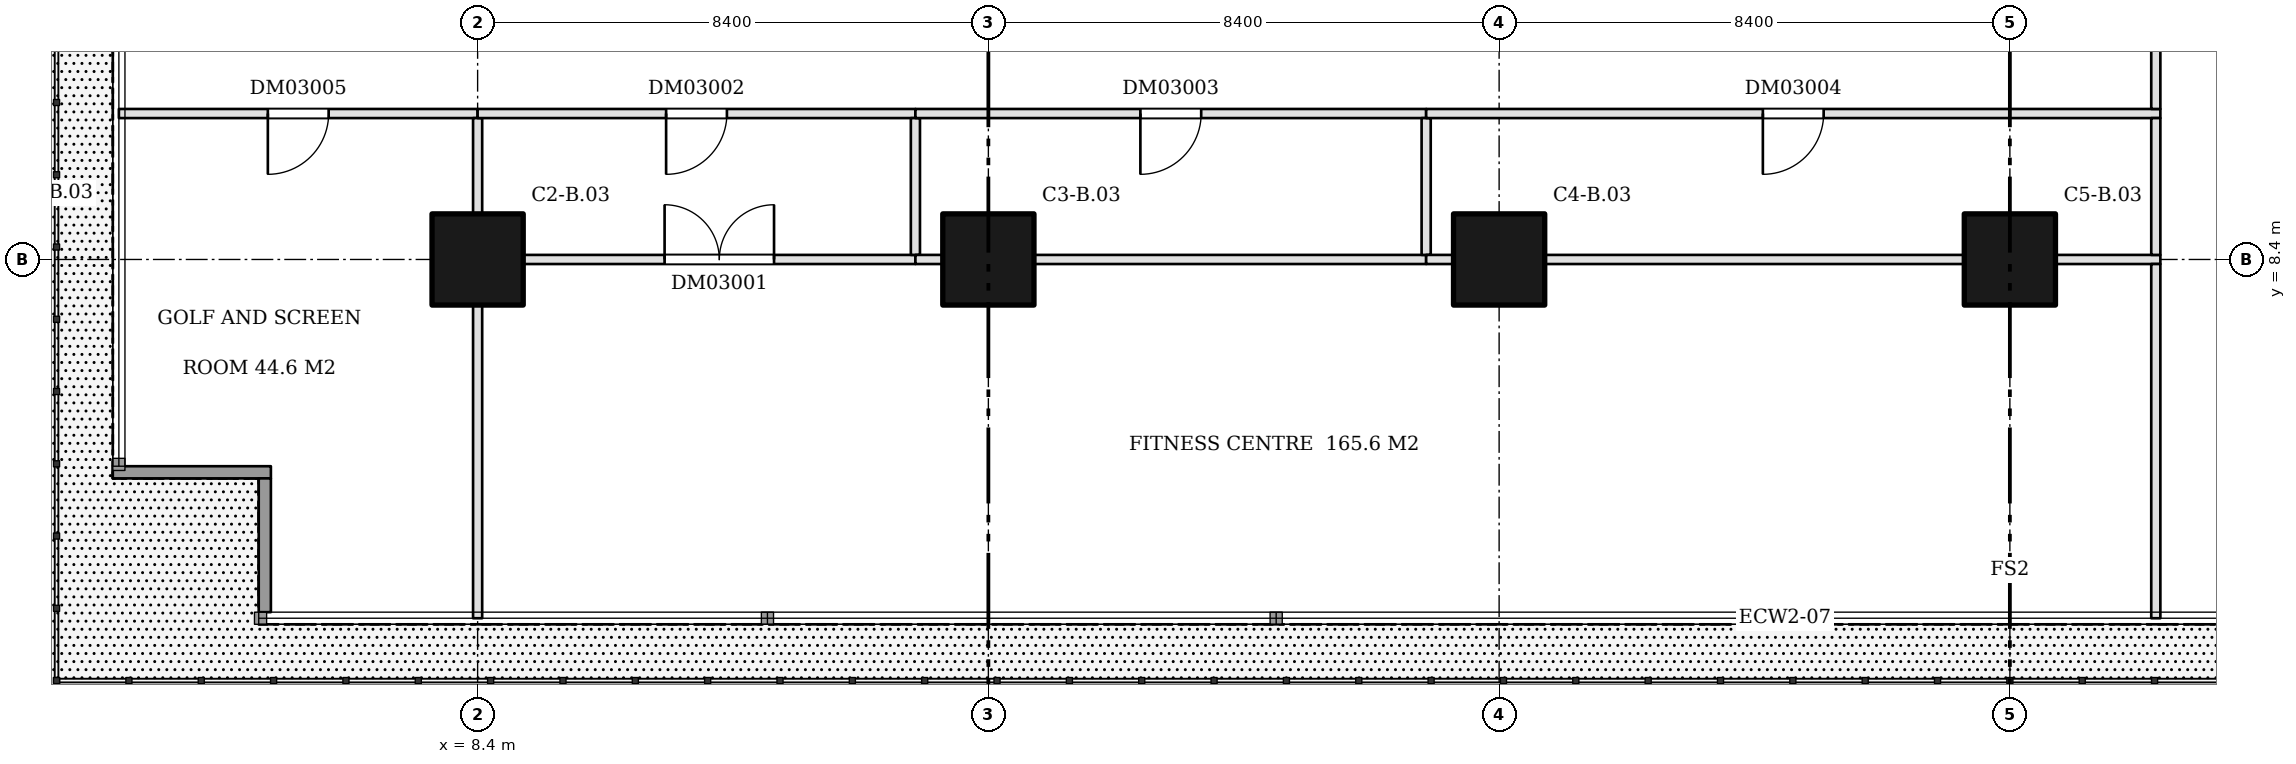
"""IFC4 building model, lengths in metres.
Left out: names, types, materials, properties, quantities, classifications, styles, units other than length and angle.
Written with IfcOpenShell. Run it as: python <this file> out.ifc"""

import sys

from ifc_helpers import new_model, si_unit, direction, frame, frame_2d, origin, origin_2d, place, context, subcontext, project, spatial, rectangle, extrude, element, fill, save


model = new_model("IFC4")
c1 = context("Model", 3, precision=1e-05, world=origin(), true_north=direction((0.0, 1.0)))
c2 = subcontext(c1, "Body", "Model", "MODEL_VIEW")
j1 = project(units=[si_unit("LENGTHUNIT", "METRE"), si_unit("PLANEANGLEUNIT", "RADIAN")], contexts=[c1])
p1 = place(None, origin())
s1 = spatial("IfcSite", under=j1, at=p1, CompositionType="ELEMENT")
p2 = place(p1, origin())
s2 = spatial("IfcBuilding", under=s1, at=p2, CompositionType="ELEMENT")
p3 = place(p2, frame((0.0, 0.0, 19.8)))
s3 = spatial("IfcBuildingStorey", under=s2, at=p3, CompositionType="ELEMENT", Elevation=19.8)
for number, where, z_axis, x_axis in (
    (1, (8.4, 8.4, 0.0), (0.0, 0.0, 1.0), (1.0, 0.0, 0.0)),
    (2, (16.8, 8.4, 0.0), (0.0, 0.0, 1.0), (1.0, 0.0, 0.0)),
    (3, (25.2, 8.4, 0.0), (0.0, 0.0, 1.0), (1.0, 0.0, 0.0)),
    (4, (33.6, 8.4, 0.0), (0.0, 0.0, 1.0), (1.0, 0.0, 0.0)),
):
    element("IfcColumn", number, at=place(p3, frame(where, z_axis=z_axis, x_axis=x_axis)), inside=s3, PredefinedType="COLUMN", context=c2, shape_type="SweptSolid", body=[
        extrude(rectangle(XDim=1.5, YDim=1.5, at=origin_2d()), origin(), (0.0, 0.0, 1.0), 5.12),
    ])
p4 = place(p3, frame((2.5, 10.8, 0.0), z_axis=(0.0, 0.0, 1.0), x_axis=(1.0, 0.0, 0.0)))
e5 = element("IfcWall", 5, at=p4, inside=s3, PredefinedType="PARTITIONING", context=c2, shape_type="SweptSolid", body=[
    extrude(rectangle(XDim=5.9, YDim=0.15, at=frame_2d((2.95, 0.0))), origin(), (0.0, 0.0, 1.0), 5.12),
])
p5 = place(p4, frame((2.45, 0.0, 0.0)))
e6 = element("IfcOpeningElement", 6, at=p5, cuts=e5, PredefinedType="OPENING", context=c2, shape_type="SweptSolid", body=[
    extrude(rectangle(XDim=1.0, YDim=2.1, at=frame_2d((0.5, 1.05))), frame((0.0, 0.085, 0.0), z_axis=(0.0, -1.0, 0.0), x_axis=(1.0, 0.0, 0.0)), (0.0, 0.0, 1.0), 0.17),
])
p6 = place(p3, frame((8.4, 2.5, 0.0), z_axis=(0.0, 0.0, 1.0), x_axis=(0.0, 1.0, 0.0)))
e7 = element("IfcWall", 7, at=p6, inside=s3, PredefinedType="PARTITIONING", context=c2, shape_type="SweptSolid", body=[
    extrude(rectangle(XDim=5.15, YDim=0.15, at=frame_2d((2.575, 0.0))), origin(), (0.0, 0.0, 1.0), 5.12),
])
p7 = place(p3, frame((8.4, 9.15, 0.0), z_axis=(0.0, 0.0, 1.0), x_axis=(0.0, 1.0, 0.0)))
e8 = element("IfcWall", 8, at=p7, inside=s3, PredefinedType="PARTITIONING", context=c2, shape_type="SweptSolid", body=[
    extrude(rectangle(XDim=1.575, YDim=0.15, at=frame_2d((0.788, 0.0))), origin(), (0.0, 0.0, 1.0), 5.12),
])
p8 = place(p3, frame((9.15, 8.4, 0.0), z_axis=(0.0, 0.0, 1.0), x_axis=(1.0, 0.0, 0.0)))
e9 = element("IfcWall", 9, at=p8, inside=s3, PredefinedType="PARTITIONING", context=c2, shape_type="SweptSolid", body=[
    extrude(rectangle(XDim=6.45, YDim=0.15, at=frame_2d((3.225, 0.0))), origin(), (0.0, 0.0, 1.0), 5.12),
])
p9 = place(p8, frame((2.325, 0.0, 0.0)))
e10 = element("IfcOpeningElement", 10, at=p9, cuts=e9, PredefinedType="OPENING", context=c2, shape_type="SweptSolid", body=[
    extrude(rectangle(XDim=1.8, YDim=2.1, at=frame_2d((0.9, 1.05))), frame((0.0, 0.085, 0.0), z_axis=(0.0, -1.0, 0.0), x_axis=(1.0, 0.0, 0.0)), (0.0, 0.0, 1.0), 0.17),
])
p10 = place(p3, frame((8.4, 10.8, 0.0), z_axis=(0.0, 0.0, 1.0), x_axis=(1.0, 0.0, 0.0)))
e11 = element("IfcWall", 11, at=p10, inside=s3, PredefinedType="PARTITIONING", context=c2, shape_type="SweptSolid", body=[
    extrude(rectangle(XDim=7.2, YDim=0.15, at=frame_2d((3.6, 0.0))), origin(), (0.0, 0.0, 1.0), 5.12),
])
p11 = place(p10, frame((3.1, 0.0, 0.0)))
e12 = element("IfcOpeningElement", 12, at=p11, cuts=e11, PredefinedType="OPENING", context=c2, shape_type="SweptSolid", body=[
    extrude(rectangle(XDim=1.0, YDim=2.1, at=frame_2d((0.5, 1.05))), frame((0.0, 0.085, 0.0), z_axis=(0.0, -1.0, 0.0), x_axis=(1.0, 0.0, 0.0)), (0.0, 0.0, 1.0), 0.17),
])
p12 = place(p3, frame((15.6, 8.475, 0.0), z_axis=(0.0, 0.0, 1.0), x_axis=(0.0, 1.0, 0.0)))
e13 = element("IfcWall", 13, at=p12, inside=s3, PredefinedType="PARTITIONING", context=c2, shape_type="SweptSolid", body=[
    extrude(rectangle(XDim=2.25, YDim=0.15, at=frame_2d((1.125, 0.0))), origin(), (0.0, 0.0, 1.0), 5.12),
])
p13 = place(p3, frame((15.6, 8.4, 0.0), z_axis=(0.0, 0.0, 1.0), x_axis=(1.0, 0.0, 0.0)))
e14 = element("IfcWall", 14, at=p13, inside=s3, PredefinedType="PARTITIONING", context=c2, shape_type="SweptSolid", body=[
    extrude(rectangle(XDim=0.45, YDim=0.15, at=frame_2d((0.225, 0.0))), origin(), (0.0, 0.0, 1.0), 5.12),
])
p14 = place(p3, frame((17.55, 8.4, 0.0), z_axis=(0.0, 0.0, 1.0), x_axis=(1.0, 0.0, 0.0)))
e15 = element("IfcWall", 15, at=p14, inside=s3, PredefinedType="PARTITIONING", context=c2, shape_type="SweptSolid", body=[
    extrude(rectangle(XDim=6.45, YDim=0.15, at=frame_2d((3.225, 0.0))), origin(), (0.0, 0.0, 1.0), 5.12),
])
p15 = place(p3, frame((15.6, 10.8, 0.0), z_axis=(0.0, 0.0, 1.0), x_axis=(1.0, 0.0, 0.0)))
e16 = element("IfcWall", 16, at=p15, inside=s3, PredefinedType="PARTITIONING", context=c2, shape_type="SweptSolid", body=[
    extrude(rectangle(XDim=8.4, YDim=0.15, at=frame_2d((4.2, 0.0))), origin(), (0.0, 0.0, 1.0), 5.12),
])
p16 = place(p15, frame((3.7, 0.0, 0.0)))
e17 = element("IfcOpeningElement", 17, at=p16, cuts=e16, PredefinedType="OPENING", context=c2, shape_type="SweptSolid", body=[
    extrude(rectangle(XDim=1.0, YDim=2.1, at=frame_2d((0.5, 1.05))), frame((0.0, 0.085, 0.0), z_axis=(0.0, -1.0, 0.0), x_axis=(1.0, 0.0, 0.0)), (0.0, 0.0, 1.0), 0.17),
])
p17 = place(p3, frame((24.0, 8.475, 0.0), z_axis=(0.0, 0.0, 1.0), x_axis=(0.0, 1.0, 0.0)))
e18 = element("IfcWall", 18, at=p17, inside=s3, PredefinedType="PARTITIONING", context=c2, shape_type="SweptSolid", body=[
    extrude(rectangle(XDim=2.25, YDim=0.15, at=frame_2d((1.125, 0.0))), origin(), (0.0, 0.0, 1.0), 5.12),
])
p18 = place(p3, frame((24.0, 8.4, 0.0), z_axis=(0.0, 0.0, 1.0), x_axis=(1.0, 0.0, 0.0)))
e19 = element("IfcWall", 19, at=p18, inside=s3, PredefinedType="PARTITIONING", context=c2, shape_type="SweptSolid", body=[
    extrude(rectangle(XDim=0.45, YDim=0.15, at=frame_2d((0.225, 0.0))), origin(), (0.0, 0.0, 1.0), 5.12),
])
p19 = place(p3, frame((25.95, 8.4, 0.0), z_axis=(0.0, 0.0, 1.0), x_axis=(1.0, 0.0, 0.0)))
e20 = element("IfcWall", 20, at=p19, inside=s3, PredefinedType="PARTITIONING", context=c2, shape_type="SweptSolid", body=[
    extrude(rectangle(XDim=6.9, YDim=0.15, at=frame_2d((3.45, 0.0))), origin(), (0.0, 0.0, 1.0), 5.12),
])
p20 = place(p3, frame((34.35, 8.4, 0.0), z_axis=(0.0, 0.0, 1.0), x_axis=(1.0, 0.0, 0.0)))
e21 = element("IfcWall", 21, at=p20, inside=s3, PredefinedType="PARTITIONING", context=c2, shape_type="SweptSolid", body=[
    extrude(rectangle(XDim=1.725, YDim=0.15, at=frame_2d((0.862, 0.0))), origin(), (0.0, 0.0, 1.0), 5.12),
])
p21 = place(p3, frame((24.0, 10.8, 0.0), z_axis=(0.0, 0.0, 1.0), x_axis=(1.0, 0.0, 0.0)))
e22 = element("IfcWall", 22, at=p21, inside=s3, PredefinedType="PARTITIONING", context=c2, shape_type="SweptSolid", body=[
    extrude(rectangle(XDim=12.075, YDim=0.15, at=frame_2d((6.038, 0.0))), origin(), (0.0, 0.0, 1.0), 5.12),
])
p22 = place(p21, frame((5.538, 0.0, 0.0)))
e23 = element("IfcOpeningElement", 23, at=p22, cuts=e22, PredefinedType="OPENING", context=c2, shape_type="SweptSolid", body=[
    extrude(rectangle(XDim=1.0, YDim=2.1, at=frame_2d((0.5, 1.05))), frame((0.0, 0.085, 0.0), z_axis=(0.0, -1.0, 0.0), x_axis=(1.0, 0.0, 0.0)), (0.0, 0.0, 1.0), 0.17),
])
p23 = place(p3, frame((36.0, 2.5, 0.0), z_axis=(0.0, 0.0, 1.0), x_axis=(0.0, 1.0, 0.0)))
e24 = element("IfcWall", 24, at=p23, inside=s3, PredefinedType="PARTITIONING", context=c2, shape_type="SweptSolid", body=[
    extrude(rectangle(XDim=5.825, YDim=0.15, at=frame_2d((2.913, 0.0))), origin(), (0.0, 0.0, 1.0), 5.12),
])
p24 = place(p3, frame((36.0, 8.475, 0.0), z_axis=(0.0, 0.0, 1.0), x_axis=(0.0, 1.0, 0.0)))
e25 = element("IfcWall", 25, at=p24, inside=s3, PredefinedType="PARTITIONING", context=c2, shape_type="SweptSolid", body=[
    extrude(rectangle(XDim=2.25, YDim=0.15, at=frame_2d((1.125, 0.0))), origin(), (0.0, 0.0, 1.0), 5.12),
])
p25 = place(p3, frame((36.0, 10.875, 0.0), z_axis=(0.0, 0.0, 1.0), x_axis=(0.0, 1.0, 0.0)))
e26 = element("IfcWall", 26, at=p25, inside=s3, PredefinedType="PARTITIONING", context=c2, shape_type="SweptSolid", body=[
    extrude(rectangle(XDim=3.45, YDim=0.15, at=frame_2d((1.725, 0.0))), origin(), (0.0, 0.0, 1.0), 5.12),
])
p26 = place(p3, frame((2.4, 4.9, 0.0), z_axis=(0.0, 0.0, 1.0), x_axis=(1.0, 0.0, 0.0)))
e27 = element("IfcWall", 27, at=p26, inside=s3, PredefinedType="SOLIDWALL", context=c2, shape_type="SweptSolid", body=[
    extrude(rectangle(XDim=2.6, YDim=0.2, at=frame_2d((1.3, 0.0))), origin(), (0.0, 0.0, 1.0), 5.12),
])
p27 = place(p3, frame((4.9, 4.8, 0.0), z_axis=(0.0, 0.0, 1.0), x_axis=(0.0, -1.0, 0.0)))
e28 = element("IfcWall", 28, at=p27, inside=s3, PredefinedType="SOLIDWALL", context=c2, shape_type="SweptSolid", body=[
    extrude(rectangle(XDim=2.2, YDim=0.2, at=frame_2d((1.1, 0.0))), origin(), (0.0, 0.0, 1.0), 5.12),
])
p28 = place(p9, origin())
e29 = element("IfcDoor", 29, at=p28, inside=s3, OperationType="DOUBLE_DOOR_SINGLE_SWING", PredefinedType="DOOR", context=c2, shape_type="SweptSolid", body=[
    extrude(rectangle(XDim=1.8, YDim=2.1, at=frame_2d((0.9, 1.05))), frame((0.0, 0.025, 0.0), z_axis=(0.0, -1.0, 0.0), x_axis=(1.0, 0.0, 0.0)), (0.0, 0.0, 1.0), 0.05),
])
fill(e10, e29)
p29 = place(p11, frame((1.0, 0.0, 0.0), z_axis=(0.0, 0.0, 1.0), x_axis=(-1.0, 0.0, 0.0)))
e30 = element("IfcDoor", 30, at=p29, inside=s3, OperationType="SINGLE_SWING_RIGHT", PredefinedType="DOOR", context=c2, shape_type="SweptSolid", body=[
    extrude(rectangle(XDim=1.0, YDim=2.1, at=frame_2d((0.5, 1.05))), frame((0.0, 0.025, 0.0), z_axis=(0.0, -1.0, 0.0), x_axis=(1.0, 0.0, 0.0)), (0.0, 0.0, 1.0), 0.05),
])
fill(e12, e30)
p30 = place(p16, frame((1.0, 0.0, 0.0), z_axis=(0.0, 0.0, 1.0), x_axis=(-1.0, 0.0, 0.0)))
e31 = element("IfcDoor", 31, at=p30, inside=s3, OperationType="SINGLE_SWING_RIGHT", PredefinedType="DOOR", context=c2, shape_type="SweptSolid", body=[
    extrude(rectangle(XDim=1.0, YDim=2.1, at=frame_2d((0.5, 1.05))), frame((0.0, 0.025, 0.0), z_axis=(0.0, -1.0, 0.0), x_axis=(1.0, 0.0, 0.0)), (0.0, 0.0, 1.0), 0.05),
])
fill(e17, e31)
p31 = place(p22, frame((1.0, 0.0, 0.0), z_axis=(0.0, 0.0, 1.0), x_axis=(-1.0, 0.0, 0.0)))
e32 = element("IfcDoor", 32, at=p31, inside=s3, OperationType="SINGLE_SWING_RIGHT", PredefinedType="DOOR", context=c2, shape_type="SweptSolid", body=[
    extrude(rectangle(XDim=1.0, YDim=2.1, at=frame_2d((0.5, 1.05))), frame((0.0, 0.025, 0.0), z_axis=(0.0, -1.0, 0.0), x_axis=(1.0, 0.0, 0.0)), (0.0, 0.0, 1.0), 0.05),
])
fill(e23, e32)
p32 = place(p5, frame((1.0, 0.0, 0.0), z_axis=(0.0, 0.0, 1.0), x_axis=(-1.0, 0.0, 0.0)))
e33 = element("IfcDoor", 33, at=p32, inside=s3, OperationType="SINGLE_SWING_RIGHT", PredefinedType="DOOR", context=c2, shape_type="SweptSolid", body=[
    extrude(rectangle(XDim=1.0, YDim=2.1, at=frame_2d((0.5, 1.05))), frame((0.0, 0.025, 0.0), z_axis=(0.0, -1.0, 0.0), x_axis=(1.0, 0.0, 0.0)), (0.0, 0.0, 1.0), 0.05),
])
fill(e6, e33)
save(model, sys.argv[1])
